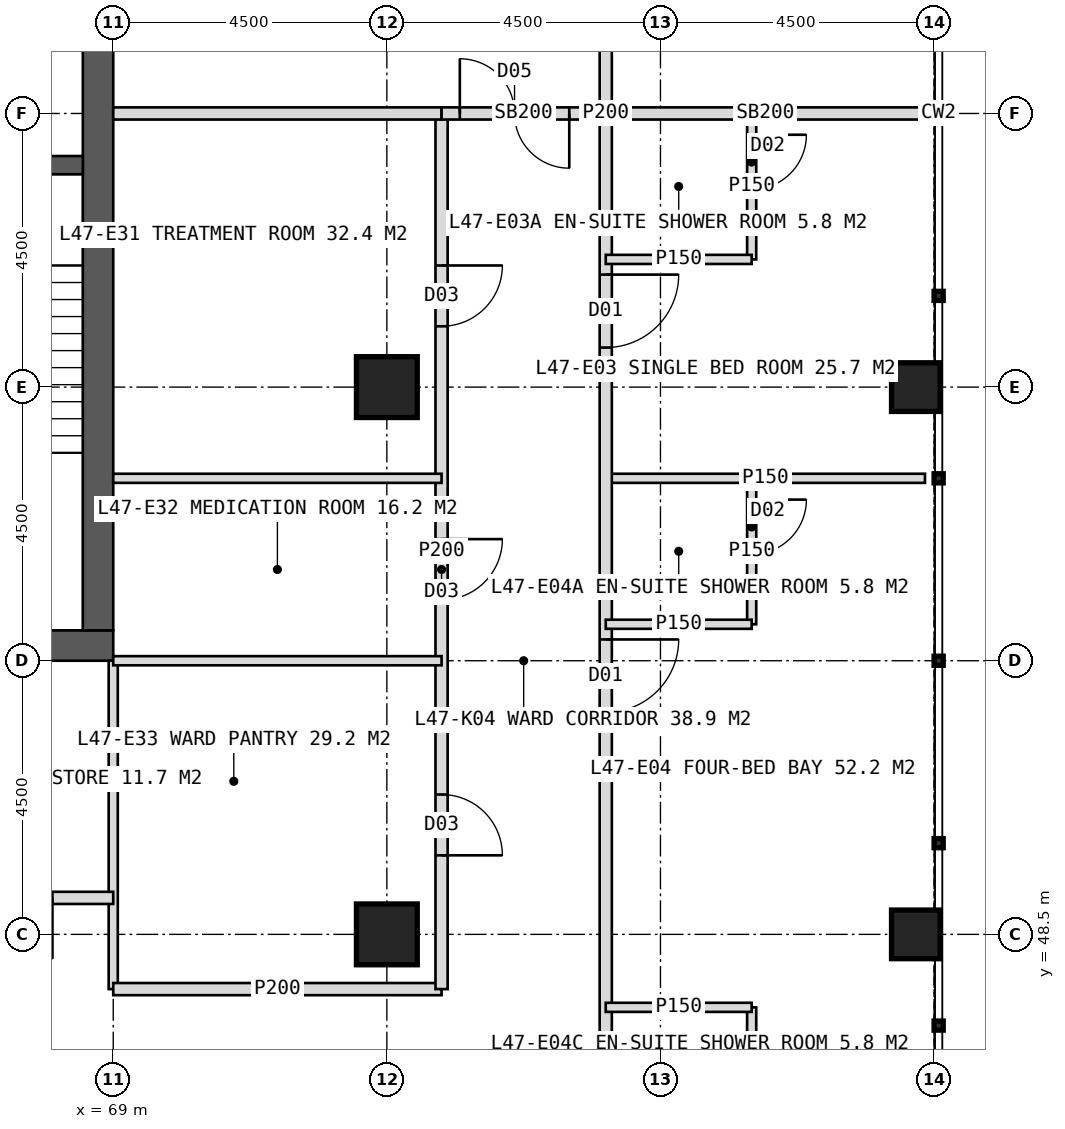
"""IFC4 building model, lengths in metres.
Left out: names, types, materials, properties, quantities, classifications, styles, units other than length and angle.
Written with IfcOpenShell. Run it as: python <this file> out.ifc"""

import sys

from ifc_helpers import new_model, si_unit, direction, frame, frame_2d, origin, origin_2d, place, context, subcontext, project, spatial, rectangle, hollow_rectangle, extrude, element, fill, save


model = new_model("IFC4")
c1 = context("Model", 3, precision=1e-05, world=origin(), true_north=direction((0.0, 1.0)))
c2 = subcontext(c1, "Body", "Model", "MODEL_VIEW")
j1 = project(units=[si_unit("LENGTHUNIT", "METRE"), si_unit("PLANEANGLEUNIT", "RADIAN")], contexts=[c1])
p1 = place(None, origin())
s1 = spatial("IfcSite", under=j1, at=p1, CompositionType="ELEMENT")
p2 = place(p1, origin())
s2 = spatial("IfcBuilding", under=s1, at=p2, CompositionType="ELEMENT")
p3 = place(p2, frame((0.0, 0.0, 197.0)))
s3 = spatial("IfcBuildingStorey", under=s2, at=p3, CompositionType="ELEMENT", Elevation=197.0)
p4 = place(p3, frame((51.0, 53.25, 0.0), z_axis=(0.0, 0.0, 1.0), x_axis=(1.0, 0.0, 0.0)))
e1 = element("IfcWall", 1, at=p4, inside=s3, PredefinedType="SHEAR", context=c2, shape_type="SweptSolid", body=[
    extrude(rectangle(XDim=18.0, YDim=0.5, at=frame_2d((9.0, 0.0))), origin(), (0.0, 0.0, 1.0), 4.0),
])
p5 = place(p4, frame((8.1, 0.0, 0.0)))
e2 = element("IfcOpeningElement", 2, at=p5, cuts=e1, PredefinedType="OPENING", context=c2, shape_type="SweptSolid", body=[
    extrude(rectangle(XDim=1.8, YDim=2.2, at=frame_2d((0.9, 1.1))), frame((0.0, 0.26, 0.0), z_axis=(0.0, -1.0, 0.0), x_axis=(1.0, 0.0, 0.0)), (0.0, 0.0, 1.0), 0.52),
])
p6 = place(p3, frame((68.75, 53.5, 0.0), z_axis=(0.0, 0.0, 1.0), x_axis=(0.0, 1.0, 0.0)))
e3 = element("IfcWall", 3, at=p6, inside=s3, PredefinedType="SHEAR", context=c2, shape_type="SweptSolid", body=[
    extrude(rectangle(XDim=17.0, YDim=0.5, at=frame_2d((8.5, 0.0))), origin(), (0.0, 0.0, 1.0), 4.0),
])
p7 = place(p6, frame((9.6, 0.0, 0.0)))
e4 = element("IfcOpeningElement", 4, at=p7, cuts=e3, PredefinedType="OPENING", context=c2, shape_type="SweptSolid", body=[
    extrude(rectangle(XDim=1.5, YDim=2.2, at=frame_2d((0.75, 1.1))), frame((0.0, 0.26, 0.0), z_axis=(0.0, -1.0, 0.0), x_axis=(1.0, 0.0, 0.0)), (0.0, 0.0, 1.0), 0.52),
])
p8 = place(p3, frame((65.2, 61.15, 0.0), z_axis=(0.0, 0.0, 1.0), x_axis=(1.0, 0.0, 0.0)))
e5 = element("IfcWall", 5, at=p8, inside=s3, PredefinedType="SHEAR", context=c2, shape_type="SweptSolid", body=[
    extrude(rectangle(XDim=3.3, YDim=0.3, at=frame_2d((1.65, 0.0))), origin(), (0.0, 0.0, 1.0), 4.0),
])
p9 = place(p8, frame((1.05, 0.0, 0.0)))
e6 = element("IfcOpeningElement", 6, at=p9, cuts=e5, PredefinedType="OPENING", context=c2, shape_type="SweptSolid", body=[
    extrude(rectangle(XDim=1.2, YDim=2.1, at=frame_2d((0.6, 1.05))), frame((0.0, 0.16, 0.0), z_axis=(0.0, -1.0, 0.0), x_axis=(1.0, 0.0, 0.0)), (0.0, 0.0, 1.0), 0.32),
])
for number, where, z_axis, x_axis in (
    (7, (73.5, 48.5, 0.0), (0.0, 0.0, 1.0), (1.0, 0.0, 0.0)),
    (8, (73.5, 57.5, 0.0), (0.0, 0.0, 1.0), (1.0, 0.0, 0.0)),
):
    element("IfcColumn", number, at=place(p3, frame(where, z_axis=z_axis, x_axis=x_axis)), inside=s3, PredefinedType="COLUMN", context=c2, shape_type="SweptSolid", body=[
        extrude(hollow_rectangle(XDim=1.0, YDim=1.0, WallThickness=0.1, at=origin_2d()), origin(), (0.0, 0.0, 1.0), 4.0),
    ])
for number, where, z_axis, x_axis in (
    (9, (82.2, 48.5, 0.0), (0.0, 0.0, 1.0), (1.0, 0.0, 0.0)),
    (10, (82.2, 57.5, 0.0), (0.0, 0.0, 1.0), (1.0, 0.0, 0.0)),
):
    element("IfcColumn", number, at=place(p3, frame(where, z_axis=z_axis, x_axis=x_axis)), inside=s3, PredefinedType="COLUMN", context=c2, shape_type="SweptSolid", body=[
        extrude(hollow_rectangle(XDim=0.8, YDim=0.8, WallThickness=0.08, at=origin_2d()), origin(), (0.0, 0.0, 1.0), 4.0),
    ])
p10 = place(p3, frame((69.0, 53.0, 0.0), z_axis=(0.0, 0.0, 1.0), x_axis=(0.0, -1.0, 0.0)))
e11 = element("IfcWall", 11, at=p10, inside=s3, PredefinedType="PARTITIONING", context=c2, shape_type="SweptSolid", body=[
    extrude(rectangle(XDim=5.4, YDim=0.15, at=frame_2d((2.7, 0.0))), origin(), (0.0, 0.0, 1.0), 3.75),
])
p11 = place(p3, frame((74.4, 47.6, 0.0), z_axis=(0.0, 0.0, 1.0), x_axis=(-1.0, 0.0, 0.0)))
e12 = element("IfcWall", 12, at=p11, inside=s3, PredefinedType="PARTITIONING", context=c2, shape_type="SweptSolid", body=[
    extrude(rectangle(XDim=5.4, YDim=0.2, at=frame_2d((2.7, 0.0))), origin(), (0.0, 0.0, 1.0), 3.75),
])
p12 = place(p3, frame((69.0, 49.1, 0.0), z_axis=(0.0, 0.0, 1.0), x_axis=(-1.0, 0.0, 0.0)))
e13 = element("IfcWall", 13, at=p12, inside=s3, PredefinedType="PARTITIONING", context=c2, shape_type="SweptSolid", body=[
    extrude(rectangle(XDim=6.75, YDim=0.2, at=frame_2d((3.375, 0.0))), origin(), (0.0, 0.0, 1.0), 3.75),
])
p13 = place(p12, frame((1.0, 0.0, 0.0)))
e14 = element("IfcOpeningElement", 14, at=p13, cuts=e13, PredefinedType="OPENING", context=c2, shape_type="SweptSolid", body=[
    extrude(rectangle(XDim=1.0, YDim=2.1, at=frame_2d((0.5, 1.05))), frame((0.0, 0.11, 0.0), z_axis=(0.0, -1.0, 0.0), x_axis=(1.0, 0.0, 0.0)), (0.0, 0.0, 1.0), 0.22),
])
p14 = place(p12, frame((5.425, 0.0, 0.0)))
e15 = element("IfcOpeningElement", 15, at=p14, cuts=e13, PredefinedType="OPENING", context=c2, shape_type="SweptSolid", body=[
    extrude(rectangle(XDim=1.0, YDim=2.1, at=frame_2d((0.5, 1.05))), frame((0.0, 0.11, 0.0), z_axis=(0.0, -1.0, 0.0), x_axis=(1.0, 0.0, 0.0)), (0.0, 0.0, 1.0), 0.22),
])
p15 = place(p3, frame((77.1, 62.0, 0.0), z_axis=(0.0, 0.0, 1.0), x_axis=(1.0, 0.0, 0.0)))
e16 = element("IfcWall", 16, at=p15, inside=s3, PredefinedType="SOLIDWALL", context=c2, shape_type="SweptSolid", body=[
    extrude(rectangle(XDim=5.25, YDim=0.2, at=frame_2d((2.625, 0.0))), origin(), (0.0, 0.0, 1.0), 2.95),
])
p16 = place(p3, frame((77.1, 56.0, 0.0), z_axis=(0.0, 0.0, 1.0), x_axis=(1.0, 0.0, 0.0)))
e17 = element("IfcWall", 17, at=p16, inside=s3, PredefinedType="PARTITIONING", context=c2, shape_type="SweptSolid", body=[
    extrude(rectangle(XDim=5.25, YDim=0.15, at=frame_2d((2.625, 0.0))), origin(), (0.0, 0.0, 1.0), 3.75),
])
p17 = place(p3, frame((77.1, 79.1, 0.0), z_axis=(0.0, 0.0, 1.0), x_axis=(0.0, -1.0, 0.0)))
e18 = element("IfcWall", 18, at=p17, inside=s3, PredefinedType="PARTITIONING", context=c2, shape_type="SweptSolid", body=[
    extrude(rectangle(XDim=34.2, YDim=0.2, at=frame_2d((17.1, 0.0))), origin(), (0.0, 0.0, 1.0), 3.75),
])
p18 = place(p17, frame((3.25, 0.0, 0.0)))
e19 = element("IfcOpeningElement", 19, at=p18, cuts=e18, PredefinedType="OPENING", context=c2, shape_type="SweptSolid", body=[
    extrude(rectangle(XDim=1.2, YDim=2.2, at=frame_2d((0.6, 1.1))), frame((0.0, 0.11, 0.0), z_axis=(0.0, -1.0, 0.0), x_axis=(1.0, 0.0, 0.0)), (0.0, 0.0, 1.0), 0.22),
])
p19 = place(p17, frame((11.35, 0.0, 0.0)))
e20 = element("IfcOpeningElement", 20, at=p19, cuts=e18, PredefinedType="OPENING", context=c2, shape_type="SweptSolid", body=[
    extrude(rectangle(XDim=1.2, YDim=2.2, at=frame_2d((0.6, 1.1))), frame((0.0, 0.11, 0.0), z_axis=(0.0, -1.0, 0.0), x_axis=(1.0, 0.0, 0.0)), (0.0, 0.0, 1.0), 0.22),
])
p20 = place(p17, frame((19.75, 0.0, 0.0)))
e21 = element("IfcOpeningElement", 21, at=p20, cuts=e18, PredefinedType="OPENING", context=c2, shape_type="SweptSolid", body=[
    extrude(rectangle(XDim=1.2, YDim=2.2, at=frame_2d((0.6, 1.1))), frame((0.0, 0.11, 0.0), z_axis=(0.0, -1.0, 0.0), x_axis=(1.0, 0.0, 0.0)), (0.0, 0.0, 1.0), 0.22),
])
p21 = place(p17, frame((25.75, 0.0, 0.0)))
e22 = element("IfcOpeningElement", 22, at=p21, cuts=e18, PredefinedType="OPENING", context=c2, shape_type="SweptSolid", body=[
    extrude(rectangle(XDim=1.2, YDim=2.2, at=frame_2d((0.6, 1.1))), frame((0.0, 0.11, 0.0), z_axis=(0.0, -1.0, 0.0), x_axis=(1.0, 0.0, 0.0)), (0.0, 0.0, 1.0), 0.22),
])
p22 = place(p3, frame((79.5, 62.0, 0.0), z_axis=(0.0, 0.0, 1.0), x_axis=(0.0, -1.0, 0.0)))
e23 = element("IfcWall", 23, at=p22, inside=s3, PredefinedType="PARTITIONING", context=c2, shape_type="SweptSolid", body=[
    extrude(rectangle(XDim=2.4, YDim=0.15, at=frame_2d((1.2, 0.0))), origin(), (0.0, 0.0, 1.0), 3.75),
])
p23 = place(p22, frame((0.35, 0.0, 0.0)))
e24 = element("IfcOpeningElement", 24, at=p23, cuts=e23, PredefinedType="OPENING", context=c2, shape_type="SweptSolid", body=[
    extrude(rectangle(XDim=0.9, YDim=2.1, at=frame_2d((0.45, 1.05))), frame((0.0, 0.085, 0.0), z_axis=(0.0, -1.0, 0.0), x_axis=(1.0, 0.0, 0.0)), (0.0, 0.0, 1.0), 0.17),
])
p24 = place(p3, frame((77.1, 59.6, 0.0), z_axis=(0.0, 0.0, 1.0), x_axis=(1.0, 0.0, 0.0)))
e25 = element("IfcWall", 25, at=p24, inside=s3, PredefinedType="PARTITIONING", context=c2, shape_type="SweptSolid", body=[
    extrude(rectangle(XDim=2.4, YDim=0.15, at=frame_2d((1.2, 0.0))), origin(), (0.0, 0.0, 1.0), 3.75),
])
p25 = place(p3, frame((79.5, 56.0, 0.0), z_axis=(0.0, 0.0, 1.0), x_axis=(0.0, -1.0, 0.0)))
e26 = element("IfcWall", 26, at=p25, inside=s3, PredefinedType="PARTITIONING", context=c2, shape_type="SweptSolid", body=[
    extrude(rectangle(XDim=2.4, YDim=0.15, at=frame_2d((1.2, 0.0))), origin(), (0.0, 0.0, 1.0), 3.75),
])
p26 = place(p25, frame((0.35, 0.0, 0.0)))
e27 = element("IfcOpeningElement", 27, at=p26, cuts=e26, PredefinedType="OPENING", context=c2, shape_type="SweptSolid", body=[
    extrude(rectangle(XDim=0.9, YDim=2.1, at=frame_2d((0.45, 1.05))), frame((0.0, 0.085, 0.0), z_axis=(0.0, -1.0, 0.0), x_axis=(1.0, 0.0, 0.0)), (0.0, 0.0, 1.0), 0.17),
])
p27 = place(p3, frame((77.1, 53.6, 0.0), z_axis=(0.0, 0.0, 1.0), x_axis=(1.0, 0.0, 0.0)))
e28 = element("IfcWall", 28, at=p27, inside=s3, PredefinedType="PARTITIONING", context=c2, shape_type="SweptSolid", body=[
    extrude(rectangle(XDim=2.4, YDim=0.15, at=frame_2d((1.2, 0.0))), origin(), (0.0, 0.0, 1.0), 3.75),
])
p28 = place(p3, frame((79.5, 47.3, 0.0), z_axis=(0.0, 0.0, 1.0), x_axis=(0.0, -1.0, 0.0)))
e29 = element("IfcWall", 29, at=p28, inside=s3, PredefinedType="PARTITIONING", context=c2, shape_type="SweptSolid", body=[
    extrude(rectangle(XDim=2.4, YDim=0.15, at=frame_2d((1.2, 0.0))), origin(), (0.0, 0.0, 1.0), 3.75),
])
p29 = place(p28, frame((1.15, 0.0, 0.0)))
e30 = element("IfcOpeningElement", 30, at=p29, cuts=e29, PredefinedType="OPENING", context=c2, shape_type="SweptSolid", body=[
    extrude(rectangle(XDim=0.9, YDim=2.1, at=frame_2d((0.45, 1.05))), frame((0.0, 0.085, 0.0), z_axis=(0.0, -1.0, 0.0), x_axis=(1.0, 0.0, 0.0)), (0.0, 0.0, 1.0), 0.17),
])
p30 = place(p3, frame((77.1, 47.3, 0.0), z_axis=(0.0, 0.0, 1.0), x_axis=(1.0, 0.0, 0.0)))
e31 = element("IfcWall", 31, at=p30, inside=s3, PredefinedType="PARTITIONING", context=c2, shape_type="SweptSolid", body=[
    extrude(rectangle(XDim=2.4, YDim=0.15, at=frame_2d((1.2, 0.0))), origin(), (0.0, 0.0, 1.0), 3.75),
])
p31 = place(p3, frame((74.4, 62.0, 0.0), z_axis=(0.0, 0.0, 1.0), x_axis=(0.0, -1.0, 0.0)))
e32 = element("IfcWall", 32, at=p31, inside=s3, PredefinedType="PARTITIONING", context=c2, shape_type="SweptSolid", body=[
    extrude(rectangle(XDim=14.4, YDim=0.2, at=frame_2d((7.2, 0.0))), origin(), (0.0, 0.0, 1.0), 3.75),
])
p32 = place(p31, frame((2.5, 0.0, 0.0)))
e33 = element("IfcOpeningElement", 33, at=p32, cuts=e32, PredefinedType="OPENING", context=c2, shape_type="SweptSolid", body=[
    extrude(rectangle(XDim=1.0, YDim=2.1, at=frame_2d((0.5, 1.05))), frame((0.0, 0.11, 0.0), z_axis=(0.0, -1.0, 0.0), x_axis=(1.0, 0.0, 0.0)), (0.0, 0.0, 1.0), 0.22),
])
p33 = place(p31, frame((7.0, 0.0, 0.0)))
e34 = element("IfcOpeningElement", 34, at=p33, cuts=e32, PredefinedType="OPENING", context=c2, shape_type="SweptSolid", body=[
    extrude(rectangle(XDim=1.0, YDim=2.1, at=frame_2d((0.5, 1.05))), frame((0.0, 0.11, 0.0), z_axis=(0.0, -1.0, 0.0), x_axis=(1.0, 0.0, 0.0)), (0.0, 0.0, 1.0), 0.22),
])
p34 = place(p31, frame((11.2, 0.0, 0.0)))
e35 = element("IfcOpeningElement", 35, at=p34, cuts=e32, PredefinedType="OPENING", context=c2, shape_type="SweptSolid", body=[
    extrude(rectangle(XDim=1.0, YDim=2.1, at=frame_2d((0.5, 1.05))), frame((0.0, 0.11, 0.0), z_axis=(0.0, -1.0, 0.0), x_axis=(1.0, 0.0, 0.0)), (0.0, 0.0, 1.0), 0.22),
])
p35 = place(p3, frame((69.0, 62.0, 0.0), z_axis=(0.0, 0.0, 1.0), x_axis=(1.0, 0.0, 0.0)))
e36 = element("IfcWall", 36, at=p35, inside=s3, PredefinedType="SOLIDWALL", context=c2, shape_type="SweptSolid", body=[
    extrude(rectangle(XDim=5.4, YDim=0.2, at=frame_2d((2.7, 0.0))), origin(), (0.0, 0.0, 1.0), 2.95),
])
for number, where, z_axis, x_axis in (
    (37, (69.0, 56.0, 0.0), (0.0, 0.0, 1.0), (1.0, 0.0, 0.0)),
    (38, (69.0, 53.0, 0.0), (0.0, 0.0, 1.0), (1.0, 0.0, 0.0)),
):
    element("IfcWall", number, at=place(p3, frame(where, z_axis=z_axis, x_axis=x_axis)), inside=s3, PredefinedType="PARTITIONING", context=c2, shape_type="SweptSolid", body=[
        extrude(rectangle(XDim=5.4, YDim=0.15, at=frame_2d((2.7, 0.0))), origin(), (0.0, 0.0, 1.0), 3.75),
    ])
p36 = place(p3, frame((74.4, 62.0, 0.0), z_axis=(0.0, 0.0, 1.0), x_axis=(1.0, 0.0, 0.0)))
e39 = element("IfcWall", 39, at=p36, inside=s3, PredefinedType="SOLIDWALL", context=c2, shape_type="SweptSolid", body=[
    extrude(rectangle(XDim=2.7, YDim=0.2, at=frame_2d((1.35, 0.0))), origin(), (0.0, 0.0, 1.0), 2.95),
])
p37 = place(p36, frame((0.3, 0.0, 0.0)))
e40 = element("IfcOpeningElement", 40, at=p37, cuts=e39, PredefinedType="OPENING", context=c2, shape_type="SweptSolid", body=[
    extrude(rectangle(XDim=1.8, YDim=2.2, at=frame_2d((0.9, 1.1))), frame((0.0, 0.11, 0.0), z_axis=(0.0, -1.0, 0.0), x_axis=(1.0, 0.0, 0.0)), (0.0, 0.0, 1.0), 0.22),
])
p38 = place(p20, origin())
e41 = element("IfcDoor", 41, at=p38, inside=s3, OperationType="SINGLE_SWING_LEFT", PredefinedType="DOOR", context=c2, shape_type="SweptSolid", body=[
    extrude(rectangle(XDim=1.2, YDim=2.2, at=frame_2d((0.6, 1.1))), frame((0.0, 0.025, 0.0), z_axis=(0.0, -1.0, 0.0), x_axis=(1.0, 0.0, 0.0)), (0.0, 0.0, 1.0), 0.05),
])
fill(e21, e41)
p39 = place(p23, origin())
e42 = element("IfcDoor", 42, at=p39, inside=s3, OperationType="SINGLE_SWING_LEFT", PredefinedType="DOOR", context=c2, shape_type="SweptSolid", body=[
    extrude(rectangle(XDim=0.9, YDim=2.1, at=frame_2d((0.45, 1.05))), frame((0.0, 0.025, 0.0), z_axis=(0.0, -1.0, 0.0), x_axis=(1.0, 0.0, 0.0)), (0.0, 0.0, 1.0), 0.05),
])
fill(e24, e42)
p40 = place(p21, origin())
e43 = element("IfcDoor", 43, at=p40, inside=s3, OperationType="SINGLE_SWING_LEFT", PredefinedType="DOOR", context=c2, shape_type="SweptSolid", body=[
    extrude(rectangle(XDim=1.2, YDim=2.2, at=frame_2d((0.6, 1.1))), frame((0.0, 0.025, 0.0), z_axis=(0.0, -1.0, 0.0), x_axis=(1.0, 0.0, 0.0)), (0.0, 0.0, 1.0), 0.05),
])
fill(e22, e43)
p41 = place(p26, origin())
e44 = element("IfcDoor", 44, at=p41, inside=s3, OperationType="SINGLE_SWING_LEFT", PredefinedType="DOOR", context=c2, shape_type="SweptSolid", body=[
    extrude(rectangle(XDim=0.9, YDim=2.1, at=frame_2d((0.45, 1.05))), frame((0.0, 0.025, 0.0), z_axis=(0.0, -1.0, 0.0), x_axis=(1.0, 0.0, 0.0)), (0.0, 0.0, 1.0), 0.05),
])
fill(e27, e44)
p42 = place(p32, origin())
e45 = element("IfcDoor", 45, at=p42, inside=s3, OperationType="SINGLE_SWING_LEFT", PredefinedType="DOOR", context=c2, shape_type="SweptSolid", body=[
    extrude(rectangle(XDim=1.0, YDim=2.1, at=frame_2d((0.5, 1.05))), frame((0.0, 0.025, 0.0), z_axis=(0.0, -1.0, 0.0), x_axis=(1.0, 0.0, 0.0)), (0.0, 0.0, 1.0), 0.05),
])
fill(e33, e45)
p43 = place(p33, origin())
e46 = element("IfcDoor", 46, at=p43, inside=s3, OperationType="SINGLE_SWING_LEFT", PredefinedType="DOOR", context=c2, shape_type="SweptSolid", body=[
    extrude(rectangle(XDim=1.0, YDim=2.1, at=frame_2d((0.5, 1.05))), frame((0.0, 0.025, 0.0), z_axis=(0.0, -1.0, 0.0), x_axis=(1.0, 0.0, 0.0)), (0.0, 0.0, 1.0), 0.05),
])
fill(e34, e46)
p44 = place(p34, origin())
e47 = element("IfcDoor", 47, at=p44, inside=s3, OperationType="SINGLE_SWING_RIGHT", PredefinedType="DOOR", context=c2, shape_type="SweptSolid", body=[
    extrude(rectangle(XDim=1.0, YDim=2.1, at=frame_2d((0.5, 1.05))), frame((0.0, 0.025, 0.0), z_axis=(0.0, -1.0, 0.0), x_axis=(1.0, 0.0, 0.0)), (0.0, 0.0, 1.0), 0.05),
])
fill(e35, e47)
p45 = place(p37, origin())
e48 = element("IfcDoor", 48, at=p45, inside=s3, OperationType="DOUBLE_DOOR_DOUBLE_SWING", PredefinedType="DOOR", context=c2, shape_type="SweptSolid", body=[
    extrude(rectangle(XDim=1.8, YDim=2.2, at=frame_2d((0.9, 1.1))), frame((0.0, 0.025, 0.0), z_axis=(0.0, -1.0, 0.0), x_axis=(1.0, 0.0, 0.0)), (0.0, 0.0, 1.0), 0.05),
])
fill(e40, e48)
save(model, sys.argv[1])
